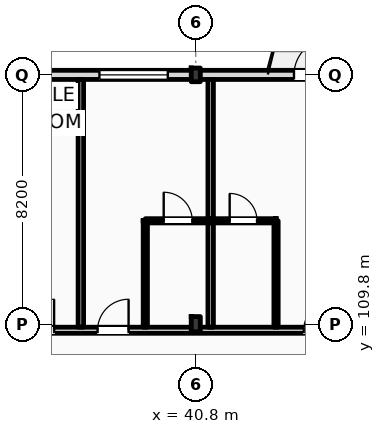
"""IFC4 building model, lengths in metres.
Left out: names, types, materials, properties, quantities, classifications, styles, units other than length and angle.
Written with IfcOpenShell. Run it as: python <this file> out.ifc"""

import sys

from ifc_helpers import new_model, si_unit, direction, frame, frame_2d, origin, origin_2d, place, context, subcontext, project, spatial, rectangle, i_section, extrude, element, fill, save


model = new_model("IFC4")
c1 = context("Model", 3, precision=1e-05, world=origin(), true_north=direction((0.0, 1.0)))
c2 = subcontext(c1, "Body", "Model", "MODEL_VIEW")
j1 = project(units=[si_unit("LENGTHUNIT", "METRE"), si_unit("PLANEANGLEUNIT", "RADIAN")], contexts=[c1])
p1 = place(None, origin())
s1 = spatial("IfcSite", under=j1, at=p1, CompositionType="ELEMENT")
p2 = place(p1, origin())
s2 = spatial("IfcBuilding", under=s1, at=p2, CompositionType="ELEMENT")
p3 = place(p2, frame((0.0, 0.0, 31.8)))
s3 = spatial("IfcBuildingStorey", under=s2, at=p3, CompositionType="ELEMENT", Elevation=31.8)
p4 = place(p3, frame((40.8, 109.8, 0.0), z_axis=(0.0, 0.0, 1.0), x_axis=(1.0, 0.0, 0.0)))
e1 = element("IfcColumn", 1, at=p4, inside=s3, PredefinedType="COLUMN", context=c2, shape_type="SweptSolid", body=[
    extrude(i_section(OverallWidth=0.3, OverallDepth=0.5, WebThickness=0.014, FlangeThickness=0.028, FilletRadius=0.027, at=origin_2d()), origin(), (0.0, 0.0, 1.0), 3.6),
])
p5 = place(p3, frame((40.8, 118.0, 0.0), z_axis=(0.0, 0.0, 1.0), x_axis=(1.0, 0.0, 0.0)))
e2 = element("IfcColumn", 2, at=p5, inside=s3, PredefinedType="COLUMN", context=c2, shape_type="SweptSolid", body=[
    extrude(i_section(OverallWidth=0.3, OverallDepth=0.45, WebThickness=0.014, FlangeThickness=0.026, FilletRadius=0.027, at=origin_2d()), origin(), (0.0, 0.0, 1.0), 3.6),
])
p6 = place(p3, frame((22.5, 118.0, 0.0), z_axis=(0.0, 0.0, 1.0), x_axis=(1.0, 0.0, 0.0)))
e3 = element("IfcWall", 3, at=p6, inside=s3, PredefinedType="STANDARD", context=c2, shape_type="SweptSolid", body=[
    extrude(rectangle(XDim=97.5, YDim=0.3, at=frame_2d((48.75, 0.0))), origin(), (0.0, 0.0, 1.0), 2.72),
])
p7 = place(p6, frame((3.61, 0.0, 0.9)))
e4 = element("IfcOpeningElement", 4, at=p7, cuts=e3, PredefinedType="OPENING", context=c2, shape_type="SweptSolid", body=[
    extrude(rectangle(XDim=1.1, YDim=1.64, at=frame_2d((0.55, 0.82))), frame((0.0, 0.16, 0.0), z_axis=(0.0, -1.0, 0.0), x_axis=(1.0, 0.0, 0.0)), (0.0, 0.0, 1.0), 0.32),
])
p8 = place(p6, frame((6.855, 0.0, 0.0)))
e5 = element("IfcOpeningElement", 5, at=p8, cuts=e3, PredefinedType="OPENING", context=c2, shape_type="SweptSolid", body=[
    extrude(rectangle(XDim=1.2, YDim=2.25, at=frame_2d((0.6, 1.125))), frame((0.0, 0.16, 0.0), z_axis=(0.0, -1.0, 0.0), x_axis=(1.0, 0.0, 0.0)), (0.0, 0.0, 1.0), 0.32),
])
p9 = place(p6, frame((11.405, 0.0, 0.9)))
e6 = element("IfcOpeningElement", 6, at=p9, cuts=e3, PredefinedType="OPENING", context=c2, shape_type="SweptSolid", body=[
    extrude(rectangle(XDim=2.1, YDim=1.64, at=frame_2d((1.05, 0.82))), frame((0.0, 0.16, 0.0), z_axis=(0.0, -1.0, 0.0), x_axis=(1.0, 0.0, 0.0)), (0.0, 0.0, 1.0), 0.32),
])
p10 = place(p6, frame((15.13, 0.0, 0.9)))
e7 = element("IfcOpeningElement", 7, at=p10, cuts=e3, PredefinedType="OPENING", context=c2, shape_type="SweptSolid", body=[
    extrude(rectangle(XDim=2.25, YDim=1.64, at=frame_2d((1.125, 0.82))), frame((0.0, 0.16, 0.0), z_axis=(0.0, -1.0, 0.0), x_axis=(1.0, 0.0, 0.0)), (0.0, 0.0, 1.0), 0.32),
])
p11 = place(p6, frame((21.53, 0.0, 0.0)))
e8 = element("IfcOpeningElement", 8, at=p11, cuts=e3, PredefinedType="OPENING", context=c2, shape_type="SweptSolid", body=[
    extrude(rectangle(XDim=1.2, YDim=2.25, at=frame_2d((0.6, 1.125))), frame((0.0, 0.16, 0.0), z_axis=(0.0, -1.0, 0.0), x_axis=(1.0, 0.0, 0.0)), (0.0, 0.0, 1.0), 0.32),
])
p12 = place(p6, frame((24.18, 0.0, 0.9)))
e9 = element("IfcOpeningElement", 9, at=p12, cuts=e3, PredefinedType="OPENING", context=c2, shape_type="SweptSolid", body=[
    extrude(rectangle(XDim=1.1, YDim=1.64, at=frame_2d((0.55, 0.82))), frame((0.0, 0.16, 0.0), z_axis=(0.0, -1.0, 0.0), x_axis=(1.0, 0.0, 0.0)), (0.0, 0.0, 1.0), 0.32),
])
p13 = place(p6, frame((29.105, 0.0, 0.9)))
e10 = element("IfcOpeningElement", 10, at=p13, cuts=e3, PredefinedType="OPENING", context=c2, shape_type="SweptSolid", body=[
    extrude(rectangle(XDim=2.7, YDim=1.64, at=frame_2d((1.35, 0.82))), frame((0.0, 0.16, 0.0), z_axis=(0.0, -1.0, 0.0), x_axis=(1.0, 0.0, 0.0)), (0.0, 0.0, 1.0), 0.32),
])
p14 = place(p6, frame((34.83, 0.0, 0.9)))
e11 = element("IfcOpeningElement", 11, at=p14, cuts=e3, PredefinedType="OPENING", context=c2, shape_type="SweptSolid", body=[
    extrude(rectangle(XDim=1.8, YDim=1.64, at=frame_2d((0.9, 0.82))), frame((0.0, 0.16, 0.0), z_axis=(0.0, -1.0, 0.0), x_axis=(1.0, 0.0, 0.0)), (0.0, 0.0, 1.0), 0.32),
])
p15 = place(p6, frame((38.525, 0.0, 0.0)))
e12 = element("IfcOpeningElement", 12, at=p15, cuts=e3, PredefinedType="OPENING", context=c2, shape_type="SweptSolid", body=[
    extrude(rectangle(XDim=1.2, YDim=2.25, at=frame_2d((0.6, 1.125))), frame((0.0, 0.16, 0.0), z_axis=(0.0, -1.0, 0.0), x_axis=(1.0, 0.0, 0.0)), (0.0, 0.0, 1.0), 0.32),
])
p16 = place(p6, frame((42.73, 0.0, 0.9)))
e13 = element("IfcOpeningElement", 13, at=p16, cuts=e3, PredefinedType="OPENING", context=c2, shape_type="SweptSolid", body=[
    extrude(rectangle(XDim=3.05, YDim=1.64, at=frame_2d((1.525, 0.82))), frame((0.0, 0.16, 0.0), z_axis=(0.0, -1.0, 0.0), x_axis=(1.0, 0.0, 0.0)), (0.0, 0.0, 1.0), 0.32),
])
p17 = place(p6, frame((47.155, 0.0, 0.9)))
e14 = element("IfcOpeningElement", 14, at=p17, cuts=e3, PredefinedType="OPENING", context=c2, shape_type="SweptSolid", body=[
    extrude(rectangle(XDim=1.35, YDim=1.64, at=frame_2d((0.675, 0.82))), frame((0.0, 0.16, 0.0), z_axis=(0.0, -1.0, 0.0), x_axis=(1.0, 0.0, 0.0)), (0.0, 0.0, 1.0), 0.32),
])
p18 = place(p6, frame((53.065, 0.0, 0.0)))
e15 = element("IfcOpeningElement", 15, at=p18, cuts=e3, PredefinedType="OPENING", context=c2, shape_type="SweptSolid", body=[
    extrude(rectangle(XDim=1.2, YDim=2.25, at=frame_2d((0.6, 1.125))), frame((0.0, 0.16, 0.0), z_axis=(0.0, -1.0, 0.0), x_axis=(1.0, 0.0, 0.0)), (0.0, 0.0, 1.0), 0.32),
])
p19 = place(p6, frame((58.2, 0.0, 0.9)))
e16 = element("IfcOpeningElement", 16, at=p19, cuts=e3, PredefinedType="OPENING", context=c2, shape_type="SweptSolid", body=[
    extrude(rectangle(XDim=1.8, YDim=1.64, at=frame_2d((0.9, 0.82))), frame((0.0, 0.16, 0.0), z_axis=(0.0, -1.0, 0.0), x_axis=(1.0, 0.0, 0.0)), (0.0, 0.0, 1.0), 0.32),
])
p20 = place(p6, frame((61.13, 0.0, 0.9)))
e17 = element("IfcOpeningElement", 17, at=p20, cuts=e3, PredefinedType="OPENING", context=c2, shape_type="SweptSolid", body=[
    extrude(rectangle(XDim=3.05, YDim=1.64, at=frame_2d((1.525, 0.82))), frame((0.0, 0.16, 0.0), z_axis=(0.0, -1.0, 0.0), x_axis=(1.0, 0.0, 0.0)), (0.0, 0.0, 1.0), 0.32),
])
p21 = place(p6, frame((67.93, 0.0, 0.0)))
e18 = element("IfcOpeningElement", 18, at=p21, cuts=e3, PredefinedType="OPENING", context=c2, shape_type="SweptSolid", body=[
    extrude(rectangle(XDim=1.2, YDim=2.25, at=frame_2d((0.6, 1.125))), frame((0.0, 0.16, 0.0), z_axis=(0.0, -1.0, 0.0), x_axis=(1.0, 0.0, 0.0)), (0.0, 0.0, 1.0), 0.32),
])
p22 = place(p6, frame((70.39, 0.0, 0.0)))
e19 = element("IfcOpeningElement", 19, at=p22, cuts=e3, PredefinedType="OPENING", context=c2, shape_type="SweptSolid", body=[
    extrude(rectangle(XDim=1.2, YDim=2.25, at=frame_2d((0.6, 1.125))), frame((0.0, 0.16, 0.0), z_axis=(0.0, -1.0, 0.0), x_axis=(1.0, 0.0, 0.0)), (0.0, 0.0, 1.0), 0.32),
])
p23 = place(p6, frame((75.905, 0.0, 0.9)))
e20 = element("IfcOpeningElement", 20, at=p23, cuts=e3, PredefinedType="OPENING", context=c2, shape_type="SweptSolid", body=[
    extrude(rectangle(XDim=1.1, YDim=1.5, at=frame_2d((0.55, 0.75))), frame((0.0, 0.16, 0.0), z_axis=(0.0, -1.0, 0.0), x_axis=(1.0, 0.0, 0.0)), (0.0, 0.0, 1.0), 0.32),
])
p24 = place(p6, frame((81.63, 0.0, 0.9)))
e21 = element("IfcOpeningElement", 21, at=p24, cuts=e3, PredefinedType="OPENING", context=c2, shape_type="SweptSolid", body=[
    extrude(rectangle(XDim=1.1, YDim=1.6, at=frame_2d((0.55, 0.8))), frame((0.0, 0.16, 0.0), z_axis=(0.0, -1.0, 0.0), x_axis=(1.0, 0.0, 0.0)), (0.0, 0.0, 1.0), 0.32),
])
p25 = place(p6, frame((84.955, 0.0, 0.9)))
e22 = element("IfcOpeningElement", 22, at=p25, cuts=e3, PredefinedType="OPENING", context=c2, shape_type="SweptSolid", body=[
    extrude(rectangle(XDim=1.4, YDim=1.64, at=frame_2d((0.7, 0.82))), frame((0.0, 0.16, 0.0), z_axis=(0.0, -1.0, 0.0), x_axis=(1.0, 0.0, 0.0)), (0.0, 0.0, 1.0), 0.32),
])
p26 = place(p6, frame((90.055, 0.0, 0.9)))
e23 = element("IfcOpeningElement", 23, at=p26, cuts=e3, PredefinedType="OPENING", context=c2, shape_type="SweptSolid", body=[
    extrude(rectangle(XDim=1.6, YDim=1.64, at=frame_2d((0.8, 0.82))), frame((0.0, 0.16, 0.0), z_axis=(0.0, -1.0, 0.0), x_axis=(1.0, 0.0, 0.0)), (0.0, 0.0, 1.0), 0.32),
])
p27 = place(p6, frame((93.87, 0.0, 0.9)))
e24 = element("IfcOpeningElement", 24, at=p27, cuts=e3, PredefinedType="OPENING", context=c2, shape_type="SweptSolid", body=[
    extrude(rectangle(XDim=1.75, YDim=1.64, at=frame_2d((0.875, 0.82))), frame((0.0, 0.16, 0.0), z_axis=(0.0, -1.0, 0.0), x_axis=(1.0, 0.0, 0.0)), (0.0, 0.0, 1.0), 0.32),
])
p28 = place(p3, frame((10.65, 109.6, 0.0), z_axis=(0.0, 0.0, 1.0), x_axis=(1.0, 0.0, 0.0)))
e25 = element("IfcWall", 25, at=p28, inside=s3, PredefinedType="PARTITIONING", context=c2, shape_type="SweptSolid", body=[
    extrude(rectangle(XDim=109.21, YDim=0.2, at=frame_2d((54.605, 0.0))), origin(), (0.0, 0.0, 1.0), 2.72),
])
p29 = place(p28, frame((15.825, 0.0, 0.0)))
e26 = element("IfcOpeningElement", 26, at=p29, cuts=e25, PredefinedType="OPENING", context=c2, shape_type="SweptSolid", body=[
    extrude(rectangle(XDim=1.02, YDim=2.2, at=frame_2d((0.51, 1.1))), frame((0.0, 0.11, 0.0), z_axis=(0.0, -1.0, 0.0), x_axis=(1.0, 0.0, 0.0)), (0.0, 0.0, 1.0), 0.22),
])
p30 = place(p28, frame((19.87, 0.0, 0.0)))
e27 = element("IfcOpeningElement", 27, at=p30, cuts=e25, PredefinedType="OPENING", context=c2, shape_type="SweptSolid", body=[
    extrude(rectangle(XDim=1.02, YDim=2.2, at=frame_2d((0.51, 1.1))), frame((0.0, 0.11, 0.0), z_axis=(0.0, -1.0, 0.0), x_axis=(1.0, 0.0, 0.0)), (0.0, 0.0, 1.0), 0.22),
])
p31 = place(p28, frame((24.47, 0.0, 0.0)))
e28 = element("IfcOpeningElement", 28, at=p31, cuts=e25, PredefinedType="OPENING", context=c2, shape_type="SweptSolid", body=[
    extrude(rectangle(XDim=1.02, YDim=2.2, at=frame_2d((0.51, 1.1))), frame((0.0, 0.11, 0.0), z_axis=(0.0, -1.0, 0.0), x_axis=(1.0, 0.0, 0.0)), (0.0, 0.0, 1.0), 0.22),
])
p32 = place(p28, frame((26.92, 0.0, 0.0)))
e29 = element("IfcOpeningElement", 29, at=p32, cuts=e25, PredefinedType="OPENING", context=c2, shape_type="SweptSolid", body=[
    extrude(rectangle(XDim=1.02, YDim=2.2, at=frame_2d((0.51, 1.1))), frame((0.0, 0.11, 0.0), z_axis=(0.0, -1.0, 0.0), x_axis=(1.0, 0.0, 0.0)), (0.0, 0.0, 1.0), 0.22),
])
p33 = place(p28, frame((33.7, 0.0, 0.0)))
e30 = element("IfcOpeningElement", 30, at=p33, cuts=e25, PredefinedType="OPENING", context=c2, shape_type="SweptSolid", body=[
    extrude(rectangle(XDim=0.96, YDim=2.2, at=frame_2d((0.48, 1.1))), frame((0.0, 0.11, 0.0), z_axis=(0.0, -1.0, 0.0), x_axis=(1.0, 0.0, 0.0)), (0.0, 0.0, 1.0), 0.22),
])
p34 = place(p28, frame((35.9, 0.0, 0.0)))
e31 = element("IfcOpeningElement", 31, at=p34, cuts=e25, PredefinedType="OPENING", context=c2, shape_type="SweptSolid", body=[
    extrude(rectangle(XDim=0.96, YDim=2.2, at=frame_2d((0.48, 1.1))), frame((0.0, 0.11, 0.0), z_axis=(0.0, -1.0, 0.0), x_axis=(1.0, 0.0, 0.0)), (0.0, 0.0, 1.0), 0.22),
])
p35 = place(p28, frame((42.9, 0.0, 0.0)))
e32 = element("IfcOpeningElement", 32, at=p35, cuts=e25, PredefinedType="OPENING", context=c2, shape_type="SweptSolid", body=[
    extrude(rectangle(XDim=0.96, YDim=2.2, at=frame_2d((0.48, 1.1))), frame((0.0, 0.11, 0.0), z_axis=(0.0, -1.0, 0.0), x_axis=(1.0, 0.0, 0.0)), (0.0, 0.0, 1.0), 0.22),
])
p36 = place(p28, frame((47.5, 0.0, 0.0)))
e33 = element("IfcOpeningElement", 33, at=p36, cuts=e25, PredefinedType="OPENING", context=c2, shape_type="SweptSolid", body=[
    extrude(rectangle(XDim=0.96, YDim=2.2, at=frame_2d((0.48, 1.1))), frame((0.0, 0.11, 0.0), z_axis=(0.0, -1.0, 0.0), x_axis=(1.0, 0.0, 0.0)), (0.0, 0.0, 1.0), 0.22),
])
p37 = place(p28, frame((49.95, 0.0, 0.0)))
e34 = element("IfcOpeningElement", 34, at=p37, cuts=e25, PredefinedType="OPENING", context=c2, shape_type="SweptSolid", body=[
    extrude(rectangle(XDim=0.96, YDim=2.2, at=frame_2d((0.48, 1.1))), frame((0.0, 0.11, 0.0), z_axis=(0.0, -1.0, 0.0), x_axis=(1.0, 0.0, 0.0)), (0.0, 0.0, 1.0), 0.22),
])
p38 = place(p28, frame((56.7, 0.0, 0.0)))
e35 = element("IfcOpeningElement", 35, at=p38, cuts=e25, PredefinedType="OPENING", context=c2, shape_type="SweptSolid", body=[
    extrude(rectangle(XDim=0.96, YDim=2.2, at=frame_2d((0.48, 1.1))), frame((0.0, 0.11, 0.0), z_axis=(0.0, -1.0, 0.0), x_axis=(1.0, 0.0, 0.0)), (0.0, 0.0, 1.0), 0.22),
])
p39 = place(p28, frame((59.15, 0.0, 0.0)))
e36 = element("IfcOpeningElement", 36, at=p39, cuts=e25, PredefinedType="OPENING", context=c2, shape_type="SweptSolid", body=[
    extrude(rectangle(XDim=0.96, YDim=2.2, at=frame_2d((0.48, 1.1))), frame((0.0, 0.11, 0.0), z_axis=(0.0, -1.0, 0.0), x_axis=(1.0, 0.0, 0.0)), (0.0, 0.0, 1.0), 0.22),
])
p40 = place(p28, frame((65.9, 0.0, 0.0)))
e37 = element("IfcOpeningElement", 37, at=p40, cuts=e25, PredefinedType="OPENING", context=c2, shape_type="SweptSolid", body=[
    extrude(rectangle(XDim=0.96, YDim=2.2, at=frame_2d((0.48, 1.1))), frame((0.0, 0.11, 0.0), z_axis=(0.0, -1.0, 0.0), x_axis=(1.0, 0.0, 0.0)), (0.0, 0.0, 1.0), 0.22),
])
p41 = place(p28, frame((70.5, 0.0, 0.0)))
e38 = element("IfcOpeningElement", 38, at=p41, cuts=e25, PredefinedType="OPENING", context=c2, shape_type="SweptSolid", body=[
    extrude(rectangle(XDim=0.96, YDim=2.2, at=frame_2d((0.48, 1.1))), frame((0.0, 0.11, 0.0), z_axis=(0.0, -1.0, 0.0), x_axis=(1.0, 0.0, 0.0)), (0.0, 0.0, 1.0), 0.22),
])
p42 = place(p28, frame((72.95, 0.0, 0.0)))
e39 = element("IfcOpeningElement", 39, at=p42, cuts=e25, PredefinedType="OPENING", context=c2, shape_type="SweptSolid", body=[
    extrude(rectangle(XDim=0.96, YDim=2.2, at=frame_2d((0.48, 1.1))), frame((0.0, 0.11, 0.0), z_axis=(0.0, -1.0, 0.0), x_axis=(1.0, 0.0, 0.0)), (0.0, 0.0, 1.0), 0.22),
])
p43 = place(p28, frame((79.7, 0.0, 0.0)))
e40 = element("IfcOpeningElement", 40, at=p43, cuts=e25, PredefinedType="OPENING", context=c2, shape_type="SweptSolid", body=[
    extrude(rectangle(XDim=0.96, YDim=2.2, at=frame_2d((0.48, 1.1))), frame((0.0, 0.11, 0.0), z_axis=(0.0, -1.0, 0.0), x_axis=(1.0, 0.0, 0.0)), (0.0, 0.0, 1.0), 0.22),
])
p44 = place(p28, frame((82.15, 0.0, 0.0)))
e41 = element("IfcOpeningElement", 41, at=p44, cuts=e25, PredefinedType="OPENING", context=c2, shape_type="SweptSolid", body=[
    extrude(rectangle(XDim=0.96, YDim=2.2, at=frame_2d((0.48, 1.1))), frame((0.0, 0.11, 0.0), z_axis=(0.0, -1.0, 0.0), x_axis=(1.0, 0.0, 0.0)), (0.0, 0.0, 1.0), 0.22),
])
p45 = place(p28, frame((88.9, 0.0, 0.0)))
e42 = element("IfcOpeningElement", 42, at=p45, cuts=e25, PredefinedType="OPENING", context=c2, shape_type="SweptSolid", body=[
    extrude(rectangle(XDim=0.96, YDim=2.2, at=frame_2d((0.48, 1.1))), frame((0.0, 0.11, 0.0), z_axis=(0.0, -1.0, 0.0), x_axis=(1.0, 0.0, 0.0)), (0.0, 0.0, 1.0), 0.22),
])
p46 = place(p28, frame((93.75, 0.0, 0.0)))
e43 = element("IfcOpeningElement", 43, at=p46, cuts=e25, PredefinedType="OPENING", context=c2, shape_type="SweptSolid", body=[
    extrude(rectangle(XDim=0.96, YDim=2.2, at=frame_2d((0.48, 1.1))), frame((0.0, 0.11, 0.0), z_axis=(0.0, -1.0, 0.0), x_axis=(1.0, 0.0, 0.0)), (0.0, 0.0, 1.0), 0.22),
])
p47 = place(p28, frame((98.1, 0.0, 0.0)))
e44 = element("IfcOpeningElement", 44, at=p47, cuts=e25, PredefinedType="OPENING", context=c2, shape_type="SweptSolid", body=[
    extrude(rectangle(XDim=0.96, YDim=2.2, at=frame_2d((0.48, 1.1))), frame((0.0, 0.11, 0.0), z_axis=(0.0, -1.0, 0.0), x_axis=(1.0, 0.0, 0.0)), (0.0, 0.0, 1.0), 0.22),
])
p48 = place(p28, frame((102.7, 0.0, 0.0)))
e45 = element("IfcOpeningElement", 45, at=p48, cuts=e25, PredefinedType="OPENING", context=c2, shape_type="SweptSolid", body=[
    extrude(rectangle(XDim=0.96, YDim=2.2, at=frame_2d((0.48, 1.1))), frame((0.0, 0.11, 0.0), z_axis=(0.0, -1.0, 0.0), x_axis=(1.0, 0.0, 0.0)), (0.0, 0.0, 1.0), 0.22),
])
p49 = place(p28, frame((105.04, 0.0, 0.0)))
e46 = element("IfcOpeningElement", 46, at=p49, cuts=e25, PredefinedType="OPENING", context=c2, shape_type="SweptSolid", body=[
    extrude(rectangle(XDim=0.96, YDim=2.2, at=frame_2d((0.48, 1.1))), frame((0.0, 0.11, 0.0), z_axis=(0.0, -1.0, 0.0), x_axis=(1.0, 0.0, 0.0)), (0.0, 0.0, 1.0), 0.22),
])
p50 = place(p28, frame((2.716, 0.0, 0.0)))
e47 = element("IfcOpeningElement", 47, at=p50, cuts=e25, PredefinedType="OPENING", context=c2, shape_type="SweptSolid", body=[
    extrude(rectangle(XDim=1.35, YDim=2.25, at=frame_2d((0.675, 1.125))), frame((0.0, 0.11, 0.0), z_axis=(0.0, -1.0, 0.0), x_axis=(1.0, 0.0, 0.0)), (0.0, 0.0, 1.0), 0.22),
])
p51 = place(p28, frame((6.65, 0.0, 0.0)))
e48 = element("IfcOpeningElement", 48, at=p51, cuts=e25, PredefinedType="OPENING", context=c2, shape_type="SweptSolid", body=[
    extrude(rectangle(XDim=1.35, YDim=2.25, at=frame_2d((0.675, 1.125))), frame((0.0, 0.11, 0.0), z_axis=(0.0, -1.0, 0.0), x_axis=(1.0, 0.0, 0.0)), (0.0, 0.0, 1.0), 0.22),
])
p52 = place(p28, frame((10.583, 0.0, 0.0)))
e49 = element("IfcOpeningElement", 49, at=p52, cuts=e25, PredefinedType="OPENING", context=c2, shape_type="SweptSolid", body=[
    extrude(rectangle(XDim=1.35, YDim=2.25, at=frame_2d((0.675, 1.125))), frame((0.0, 0.11, 0.0), z_axis=(0.0, -1.0, 0.0), x_axis=(1.0, 0.0, 0.0)), (0.0, 0.0, 1.0), 0.22),
])
for number, where, z_axis, x_axis in (
    (50, (37.02, 109.7, 0.0), (0.0, 0.0, 1.0), (0.0, 1.0, 0.0)),
    (51, (41.29, 109.7, 0.0), (0.0, 0.0, 1.0), (0.0, 1.0, 0.0)),
):
    element("IfcWall", number, at=place(p3, frame(where, z_axis=z_axis, x_axis=x_axis)), inside=s3, PredefinedType="PARTITIONING", context=c2, shape_type="SweptSolid", body=[
        extrude(rectangle(XDim=8.15, YDim=0.18, at=frame_2d((4.075, 0.0))), origin(), (0.0, 0.0, 1.0), 3.36),
    ])
p53 = place(p3, frame((39.14, 109.7, 0.0), z_axis=(0.0, 0.0, 1.0), x_axis=(0.0, 1.0, 0.0)))
e52 = element("IfcWall", 52, at=p53, inside=s3, PredefinedType="PARTITIONING", context=c2, shape_type="SweptSolid", body=[
    extrude(rectangle(XDim=3.5, YDim=0.14, at=frame_2d((1.75, 0.0))), origin(), (0.0, 0.0, 1.0), 3.36),
])
p54 = place(p3, frame((39.14, 113.2, 0.0), z_axis=(0.0, 0.0, 1.0), x_axis=(1.0, 0.0, 0.0)))
e53 = element("IfcWall", 53, at=p54, inside=s3, PredefinedType="PARTITIONING", context=c2, shape_type="SweptSolid", body=[
    extrude(rectangle(XDim=2.15, YDim=0.14, at=frame_2d((1.075, 0.0))), origin(), (0.0, 0.0, 1.0), 3.36),
])
p55 = place(p54, frame((0.605, 0.0, 0.0)))
e54 = element("IfcOpeningElement", 54, at=p55, cuts=e53, PredefinedType="OPENING", context=c2, shape_type="SweptSolid", body=[
    extrude(rectangle(XDim=0.94, YDim=2.15, at=frame_2d((0.47, 1.075))), frame((0.0, 0.08, 0.0), z_axis=(0.0, -1.0, 0.0), x_axis=(1.0, 0.0, 0.0)), (0.0, 0.0, 1.0), 0.16),
])
p56 = place(p3, frame((43.44, 109.7, 0.0), z_axis=(0.0, 0.0, 1.0), x_axis=(0.0, 1.0, 0.0)))
e55 = element("IfcWall", 55, at=p56, inside=s3, PredefinedType="PARTITIONING", context=c2, shape_type="SweptSolid", body=[
    extrude(rectangle(XDim=3.5, YDim=0.14, at=frame_2d((1.75, 0.0))), origin(), (0.0, 0.0, 1.0), 3.05),
])
p57 = place(p3, frame((41.29, 113.2, 0.0), z_axis=(0.0, 0.0, 1.0), x_axis=(1.0, 0.0, 0.0)))
e56 = element("IfcWall", 56, at=p57, inside=s3, PredefinedType="PARTITIONING", context=c2, shape_type="SweptSolid", body=[
    extrude(rectangle(XDim=2.15, YDim=0.14, at=frame_2d((1.075, 0.0))), origin(), (0.0, 0.0, 1.0), 3.36),
])
p58 = place(p57, frame((0.625, 0.0, 0.0)))
e57 = element("IfcOpeningElement", 57, at=p58, cuts=e56, PredefinedType="OPENING", context=c2, shape_type="SweptSolid", body=[
    extrude(rectangle(XDim=0.9, YDim=2.1, at=frame_2d((0.45, 1.05))), frame((0.0, 0.08, 0.0), z_axis=(0.0, -1.0, 0.0), x_axis=(1.0, 0.0, 0.0)), (0.0, 0.0, 1.0), 0.16),
])
p59 = place(p10, origin())
e58 = element("IfcWindow", 58, at=p59, inside=s3, PartitioningType="DOUBLE_PANEL_VERTICAL", PredefinedType="WINDOW", context=c2, shape_type="SweptSolid", body=[
    extrude(rectangle(XDim=2.25, YDim=1.64, at=frame_2d((1.125, 0.82))), frame((0.0, 0.03, 0.0), z_axis=(0.0, -1.0, 0.0), x_axis=(1.0, 0.0, 0.0)), (0.0, 0.0, 1.0), 0.06),
])
fill(e7, e58)
p60 = place(p11, origin())
e59 = element("IfcDoor", 59, at=p60, inside=s3, OperationType="SINGLE_SWING_RIGHT", PredefinedType="DOOR", context=c2, shape_type="SweptSolid", body=[
    extrude(rectangle(XDim=1.2, YDim=2.25, at=frame_2d((0.6, 1.125))), frame((0.0, 0.025, 0.0), z_axis=(0.0, -1.0, 0.0), x_axis=(1.0, 0.0, 0.0)), (0.0, 0.0, 1.0), 0.05),
])
fill(e8, e59)
p61 = place(p31, origin())
e60 = element("IfcDoor", 60, at=p61, inside=s3, OperationType="SINGLE_SWING_RIGHT", PredefinedType="DOOR", context=c2, shape_type="SweptSolid", body=[
    extrude(rectangle(XDim=1.02, YDim=2.2, at=frame_2d((0.51, 1.1))), frame((0.0, 0.025, 0.0), z_axis=(0.0, -1.0, 0.0), x_axis=(1.0, 0.0, 0.0)), (0.0, 0.0, 1.0), 0.05),
])
fill(e28, e60)
p62 = place(p32, origin())
e61 = element("IfcDoor", 61, at=p62, inside=s3, OperationType="SINGLE_SWING_RIGHT", PredefinedType="DOOR", context=c2, shape_type="SweptSolid", body=[
    extrude(rectangle(XDim=1.02, YDim=2.2, at=frame_2d((0.51, 1.1))), frame((0.0, 0.025, 0.0), z_axis=(0.0, -1.0, 0.0), x_axis=(1.0, 0.0, 0.0)), (0.0, 0.0, 1.0), 0.05),
])
fill(e29, e61)
p63 = place(p55, origin())
e62 = element("IfcDoor", 62, at=p63, inside=s3, OperationType="SINGLE_SWING_LEFT", PredefinedType="DOOR", context=c2, shape_type="SweptSolid", body=[
    extrude(rectangle(XDim=0.94, YDim=2.15, at=frame_2d((0.47, 1.075))), frame((0.0, 0.025, 0.0), z_axis=(0.0, -1.0, 0.0), x_axis=(1.0, 0.0, 0.0)), (0.0, 0.0, 1.0), 0.05),
])
fill(e54, e62)
p64 = place(p33, origin())
e63 = element("IfcDoor", 63, at=p64, inside=s3, OperationType="SINGLE_SWING_RIGHT", PredefinedType="DOOR", context=c2, shape_type="SweptSolid", body=[
    extrude(rectangle(XDim=0.96, YDim=2.2, at=frame_2d((0.48, 1.1))), frame((0.0, 0.025, 0.0), z_axis=(0.0, -1.0, 0.0), x_axis=(1.0, 0.0, 0.0)), (0.0, 0.0, 1.0), 0.05),
])
fill(e30, e63)
p65 = place(p58, origin())
e64 = element("IfcDoor", 64, at=p65, inside=s3, OperationType="SINGLE_SWING_LEFT", PredefinedType="DOOR", context=c2, shape_type="SweptSolid", body=[
    extrude(rectangle(XDim=0.9, YDim=2.1, at=frame_2d((0.45, 1.05))), frame((0.0, 0.025, 0.0), z_axis=(0.0, -1.0, 0.0), x_axis=(1.0, 0.0, 0.0)), (0.0, 0.0, 1.0), 0.05),
])
fill(e57, e64)
save(model, sys.argv[1])
